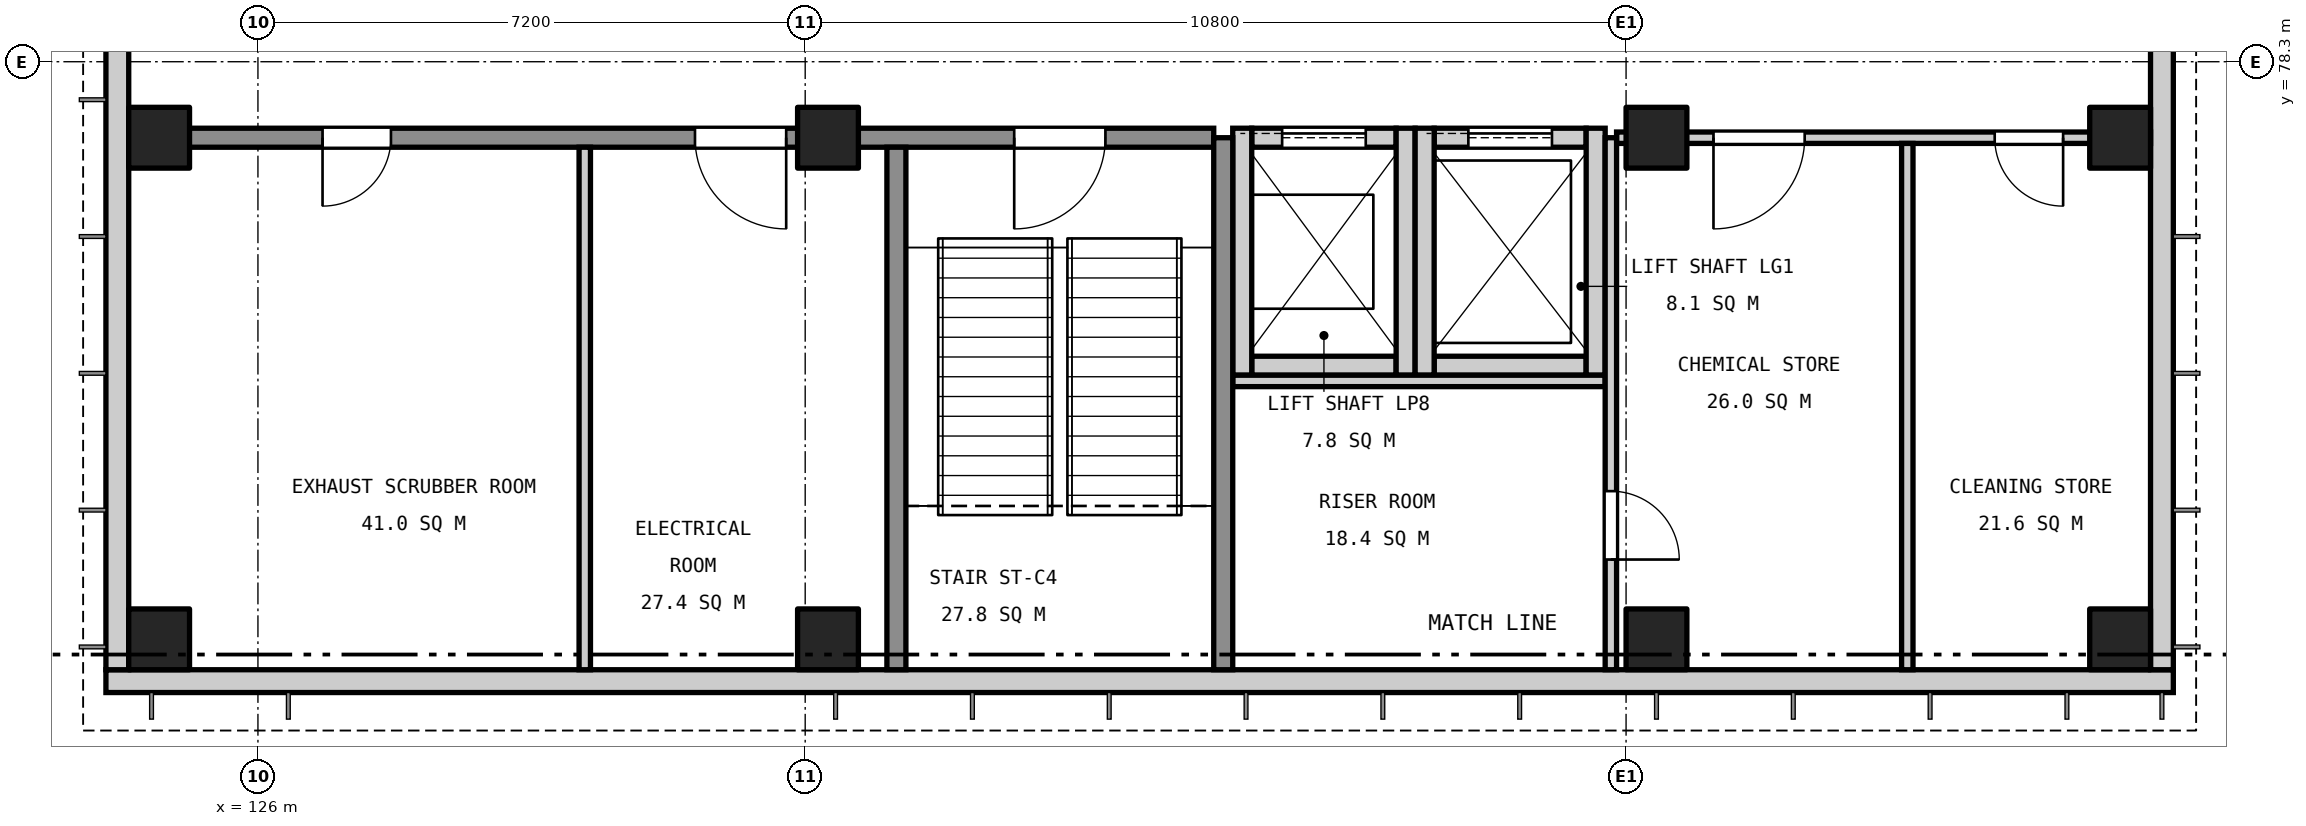
"""IFC4 building model, lengths in metres.
Left out: names, types, materials, properties, quantities, classifications, styles, units other than length and angle.
Written with IfcOpenShell. Run it as: python <this file> out.ifc"""

import sys

from ifc_helpers import new_model, si_unit, direction, frame, frame_2d, origin, origin_2d, place, context, subcontext, project, spatial, rectangle, extrude, element, fill, save


model = new_model("IFC4")
c1 = context("Model", 3, precision=1e-05, world=origin(), true_north=direction((0.0, 1.0)))
c2 = subcontext(c1, "Body", "Model", "MODEL_VIEW")
j1 = project(units=[si_unit("LENGTHUNIT", "METRE"), si_unit("PLANEANGLEUNIT", "RADIAN")], contexts=[c1])
p1 = place(None, origin())
s1 = spatial("IfcSite", under=j1, at=p1, CompositionType="ELEMENT")
p2 = place(p1, origin())
s2 = spatial("IfcBuilding", under=s1, at=p2, CompositionType="ELEMENT")
p3 = place(p2, frame((0.0, 0.0, 16.8)))
s3 = spatial("IfcBuildingStorey", under=s2, at=p3, CompositionType="ELEMENT", Elevation=16.8)
p4 = place(p3, frame((139.075, 74.3, 0.0), z_axis=(0.0, 0.0, 1.0), x_axis=(1.0, 0.0, 0.0)))
e1 = element("IfcWall", 1, at=p4, inside=s3, PredefinedType="SOLIDWALL", context=c2, shape_type="SweptSolid", body=[
    extrude(rectangle(XDim=1.9, YDim=0.25, at=frame_2d((0.95, 0.0))), origin(), (0.0, 0.0, 1.0), 4.95),
])
p5 = place(p3, frame((139.075, 77.3, 0.0), z_axis=(0.0, 0.0, 1.0), x_axis=(1.0, 0.0, 0.0)))
e2 = element("IfcWall", 2, at=p5, inside=s3, PredefinedType="SOLIDWALL", context=c2, shape_type="SweptSolid", body=[
    extrude(rectangle(XDim=1.9, YDim=0.25, at=frame_2d((0.95, 0.0))), origin(), (0.0, 0.0, 1.0), 4.95),
])
p6 = place(p5, frame((0.4, 0.0, 0.0)))
e3 = element("IfcOpeningElement", 3, at=p6, cuts=e2, PredefinedType="OPENING", context=c2, shape_type="SweptSolid", body=[
    extrude(rectangle(XDim=1.1, YDim=2.1, at=frame_2d((0.55, 1.05))), frame((0.0, 0.135, 0.0), z_axis=(0.0, -1.0, 0.0), x_axis=(1.0, 0.0, 0.0)), (0.0, 0.0, 1.0), 0.27),
])
for number, where, z_axis, x_axis in (
    (4, (138.95, 74.175, 0.0), (0.0, 0.0, 1.0), (0.0, 1.0, 0.0)),
    (5, (141.1, 74.175, 0.0), (0.0, 0.0, 1.0), (0.0, 1.0, 0.0)),
):
    element("IfcWall", number, at=place(p3, frame(where, z_axis=z_axis, x_axis=x_axis)), inside=s3, PredefinedType="SOLIDWALL", context=c2, shape_type="SweptSolid", body=[
        extrude(rectangle(XDim=3.25, YDim=0.25, at=frame_2d((1.625, 0.0))), origin(), (0.0, 0.0, 1.0), 4.95),
    ])
p7 = place(p3, frame((141.475, 74.3, 0.0), z_axis=(0.0, 0.0, 1.0), x_axis=(1.0, 0.0, 0.0)))
e6 = element("IfcWall", 6, at=p7, inside=s3, PredefinedType="SOLIDWALL", context=c2, shape_type="SweptSolid", body=[
    extrude(rectangle(XDim=2.0, YDim=0.25, at=frame_2d((1.0, 0.0))), origin(), (0.0, 0.0, 1.0), 4.95),
])
p8 = place(p3, frame((141.475, 77.3, 0.0), z_axis=(0.0, 0.0, 1.0), x_axis=(1.0, 0.0, 0.0)))
e7 = element("IfcWall", 7, at=p8, inside=s3, PredefinedType="SOLIDWALL", context=c2, shape_type="SweptSolid", body=[
    extrude(rectangle(XDim=2.0, YDim=0.25, at=frame_2d((1.0, 0.0))), origin(), (0.0, 0.0, 1.0), 4.95),
])
p9 = place(p8, frame((0.45, 0.0, 0.0)))
e8 = element("IfcOpeningElement", 8, at=p9, cuts=e7, PredefinedType="OPENING", context=c2, shape_type="SweptSolid", body=[
    extrude(rectangle(XDim=1.1, YDim=2.1, at=frame_2d((0.55, 1.05))), frame((0.0, 0.135, 0.0), z_axis=(0.0, -1.0, 0.0), x_axis=(1.0, 0.0, 0.0)), (0.0, 0.0, 1.0), 0.27),
])
for number, where, z_axis, x_axis in (
    (9, (141.35, 74.175, 0.0), (0.0, 0.0, 1.0), (0.0, 1.0, 0.0)),
    (10, (143.6, 74.175, 0.0), (0.0, 0.0, 1.0), (0.0, 1.0, 0.0)),
):
    element("IfcWall", number, at=place(p3, frame(where, z_axis=z_axis, x_axis=x_axis)), inside=s3, PredefinedType="SOLIDWALL", context=c2, shape_type="SweptSolid", body=[
        extrude(rectangle(XDim=3.25, YDim=0.25, at=frame_2d((1.625, 0.0))), origin(), (0.0, 0.0, 1.0), 4.95),
    ])
for number, where, z_axis, x_axis in (
    (11, (124.7, 70.7, 0.0), (0.0, 0.0, 1.0), (1.0, 0.0, 0.0)),
    (12, (124.7, 77.3, 0.0), (0.0, 0.0, 1.0), (1.0, 0.0, 0.0)),
    (13, (133.5, 70.7, 0.0), (0.0, 0.0, 1.0), (1.0, 0.0, 0.0)),
    (14, (133.5, 77.3, 0.0), (0.0, 0.0, 1.0), (1.0, 0.0, 0.0)),
    (15, (144.4, 70.7, 0.0), (0.0, 0.0, 1.0), (1.0, 0.0, 0.0)),
    (16, (144.4, 77.3, 0.0), (0.0, 0.0, 1.0), (1.0, 0.0, 0.0)),
    (17, (150.5, 70.7, 0.0), (0.0, 0.0, 1.0), (1.0, 0.0, 0.0)),
    (18, (150.5, 77.3, 0.0), (0.0, 0.0, 1.0), (1.0, 0.0, 0.0)),
):
    element("IfcColumn", number, at=place(p3, frame(where, z_axis=z_axis, x_axis=x_axis)), inside=s3, PredefinedType="COLUMN", context=c2, shape_type="SweptSolid", body=[
        extrude(rectangle(XDim=0.8, YDim=0.8, at=origin_2d()), origin(), (0.0, 0.0, 1.0), 5.4),
    ])
p10 = place(p3, frame((124.0, 70.15, 0.0), z_axis=(0.0, 0.0, 1.0), x_axis=(1.0, 0.0, 0.0)))
e19 = element("IfcWall", 19, at=p10, inside=s3, PredefinedType="SOLIDWALL", context=c2, shape_type="SweptSolid", body=[
    extrude(rectangle(XDim=27.2, YDim=0.3, at=frame_2d((13.6, 0.0))), origin(), (0.0, 0.0, 1.0), 4.95),
])
for number, where, z_axis, x_axis in (
    (20, (124.15, 70.3, 0.0), (0.0, 0.0, 1.0), (0.0, 1.0, 0.0)),
    (21, (151.05, 70.3, 0.0), (0.0, 0.0, 1.0), (0.0, 1.0, 0.0)),
):
    element("IfcWall", number, at=place(p3, frame(where, z_axis=z_axis, x_axis=x_axis)), inside=s3, PredefinedType="SOLIDWALL", context=c2, shape_type="SweptSolid", body=[
        extrude(rectangle(XDim=36.5, YDim=0.3, at=frame_2d((18.25, 0.0))), origin(), (0.0, 0.0, 1.0), 4.95),
    ])
p11 = place(p3, frame((138.825, 74.1, 0.0), z_axis=(0.0, 0.0, 1.0), x_axis=(1.0, 0.0, 0.0)))
e22 = element("IfcWall", 22, at=p11, inside=s3, PredefinedType="SOLIDWALL", context=c2, shape_type="SweptSolid", body=[
    extrude(rectangle(XDim=4.9, YDim=0.15, at=frame_2d((2.45, 0.0))), origin(), (0.0, 0.0, 1.0), 4.95),
])
p12 = place(p3, frame((124.3, 77.3, 0.0), z_axis=(0.0, 0.0, 1.0), x_axis=(1.0, 0.0, 0.0)))
e23 = element("IfcWall", 23, at=p12, inside=s3, PredefinedType="SOLIDWALL", context=c2, shape_type="SweptSolid", body=[
    extrude(rectangle(XDim=14.275, YDim=0.25, at=frame_2d((7.137, 0.0))), origin(), (0.0, 0.0, 1.0), 4.95),
])
p13 = place(p12, frame((2.55, 0.0, 0.0)))
e24 = element("IfcOpeningElement", 24, at=p13, cuts=e23, PredefinedType="OPENING", context=c2, shape_type="SweptSolid", body=[
    extrude(rectangle(XDim=0.9, YDim=2.1, at=frame_2d((0.45, 1.05))), frame((0.0, 0.135, 0.0), z_axis=(0.0, -1.0, 0.0), x_axis=(1.0, 0.0, 0.0)), (0.0, 0.0, 1.0), 0.27),
])
p14 = place(p12, frame((7.45, 0.0, 0.0)))
e25 = element("IfcOpeningElement", 25, at=p14, cuts=e23, PredefinedType="OPENING", context=c2, shape_type="SweptSolid", body=[
    extrude(rectangle(XDim=1.2, YDim=2.1, at=frame_2d((0.6, 1.05))), frame((0.0, 0.135, 0.0), z_axis=(0.0, -1.0, 0.0), x_axis=(1.0, 0.0, 0.0)), (0.0, 0.0, 1.0), 0.27),
])
p15 = place(p12, frame((11.65, 0.0, 0.0)))
e26 = element("IfcOpeningElement", 26, at=p15, cuts=e23, PredefinedType="OPENING", context=c2, shape_type="SweptSolid", body=[
    extrude(rectangle(XDim=1.2, YDim=2.1, at=frame_2d((0.6, 1.05))), frame((0.0, 0.135, 0.0), z_axis=(0.0, -1.0, 0.0), x_axis=(1.0, 0.0, 0.0)), (0.0, 0.0, 1.0), 0.27),
])
p16 = place(p3, frame((143.875, 77.3, 0.0), z_axis=(0.0, 0.0, 1.0), x_axis=(1.0, 0.0, 0.0)))
e27 = element("IfcWall", 27, at=p16, inside=s3, PredefinedType="SOLIDWALL", context=c2, shape_type="SweptSolid", body=[
    extrude(rectangle(XDim=7.025, YDim=0.15, at=frame_2d((3.512, 0.0))), origin(), (0.0, 0.0, 1.0), 4.95),
])
p17 = place(p16, frame((1.275, 0.0, 0.0)))
e28 = element("IfcOpeningElement", 28, at=p17, cuts=e27, PredefinedType="OPENING", context=c2, shape_type="SweptSolid", body=[
    extrude(rectangle(XDim=1.2, YDim=2.1, at=frame_2d((0.6, 1.05))), frame((0.0, 0.085, 0.0), z_axis=(0.0, -1.0, 0.0), x_axis=(1.0, 0.0, 0.0)), (0.0, 0.0, 1.0), 0.17),
])
p18 = place(p16, frame((4.975, 0.0, 0.0)))
e29 = element("IfcOpeningElement", 29, at=p18, cuts=e27, PredefinedType="OPENING", context=c2, shape_type="SweptSolid", body=[
    extrude(rectangle(XDim=0.9, YDim=2.1, at=frame_2d((0.45, 1.05))), frame((0.0, 0.085, 0.0), z_axis=(0.0, -1.0, 0.0), x_axis=(1.0, 0.0, 0.0)), (0.0, 0.0, 1.0), 0.17),
])
p19 = place(p3, frame((130.3, 70.3, 0.0), z_axis=(0.0, 0.0, 1.0), x_axis=(0.0, 1.0, 0.0)))
e30 = element("IfcWall", 30, at=p19, inside=s3, PredefinedType="SOLIDWALL", context=c2, shape_type="SweptSolid", body=[
    extrude(rectangle(XDim=6.875, YDim=0.15, at=frame_2d((3.438, 0.0))), origin(), (0.0, 0.0, 1.0), 4.95),
])
p20 = place(p3, frame((134.4, 70.3, 0.0), z_axis=(0.0, 0.0, 1.0), x_axis=(0.0, 1.0, 0.0)))
e31 = element("IfcWall", 31, at=p20, inside=s3, PredefinedType="SOLIDWALL", context=c2, shape_type="SweptSolid", body=[
    extrude(rectangle(XDim=6.875, YDim=0.25, at=frame_2d((3.438, 0.0))), origin(), (0.0, 0.0, 1.0), 4.95),
])
p21 = place(p3, frame((138.7, 70.3, 0.0), z_axis=(0.0, 0.0, 1.0), x_axis=(0.0, 1.0, 0.0)))
e32 = element("IfcWall", 32, at=p21, inside=s3, PredefinedType="SOLIDWALL", context=c2, shape_type="SweptSolid", body=[
    extrude(rectangle(XDim=7.0, YDim=0.25, at=frame_2d((3.5, 0.0))), origin(), (0.0, 0.0, 1.0), 4.95),
])
p22 = place(p3, frame((143.8, 70.3, 0.0), z_axis=(0.0, 0.0, 1.0), x_axis=(0.0, 1.0, 0.0)))
e33 = element("IfcWall", 33, at=p22, inside=s3, PredefinedType="SOLIDWALL", context=c2, shape_type="SweptSolid", body=[
    extrude(rectangle(XDim=7.0, YDim=0.15, at=frame_2d((3.5, 0.0))), origin(), (0.0, 0.0, 1.0), 4.95),
])
p23 = place(p22, frame((1.45, 0.0, 0.0)))
e34 = element("IfcOpeningElement", 34, at=p23, cuts=e33, PredefinedType="OPENING", context=c2, shape_type="SweptSolid", body=[
    extrude(rectangle(XDim=0.9, YDim=2.1, at=frame_2d((0.45, 1.05))), frame((0.0, 0.085, 0.0), z_axis=(0.0, -1.0, 0.0), x_axis=(1.0, 0.0, 0.0)), (0.0, 0.0, 1.0), 0.17),
])
p24 = place(p3, frame((147.7, 70.3, 0.0), z_axis=(0.0, 0.0, 1.0), x_axis=(0.0, 1.0, 0.0)))
e35 = element("IfcWall", 35, at=p24, inside=s3, PredefinedType="SOLIDWALL", context=c2, shape_type="SweptSolid", body=[
    extrude(rectangle(XDim=6.925, YDim=0.15, at=frame_2d((3.462, 0.0))), origin(), (0.0, 0.0, 1.0), 4.95),
])
p25 = place(p13, frame((0.9, 0.0, 0.0), z_axis=(0.0, 0.0, 1.0), x_axis=(-1.0, 0.0, 0.0)))
e36 = element("IfcDoor", 36, at=p25, inside=s3, OperationType="SINGLE_SWING_RIGHT", PredefinedType="DOOR", context=c2, shape_type="SweptSolid", body=[
    extrude(rectangle(XDim=0.9, YDim=2.1, at=frame_2d((0.45, 1.05))), frame((0.0, 0.025, 0.0), z_axis=(0.0, -1.0, 0.0), x_axis=(1.0, 0.0, 0.0)), (0.0, 0.0, 1.0), 0.05),
])
fill(e24, e36)
p26 = place(p14, frame((1.2, 0.0, 0.0), z_axis=(0.0, 0.0, 1.0), x_axis=(-1.0, 0.0, 0.0)))
e37 = element("IfcDoor", 37, at=p26, inside=s3, OperationType="SINGLE_SWING_LEFT", PredefinedType="DOOR", context=c2, shape_type="SweptSolid", body=[
    extrude(rectangle(XDim=1.2, YDim=2.1, at=frame_2d((0.6, 1.05))), frame((0.0, 0.025, 0.0), z_axis=(0.0, -1.0, 0.0), x_axis=(1.0, 0.0, 0.0)), (0.0, 0.0, 1.0), 0.05),
])
fill(e25, e37)
p27 = place(p17, frame((1.2, 0.0, 0.0), z_axis=(0.0, 0.0, 1.0), x_axis=(-1.0, 0.0, 0.0)))
e38 = element("IfcDoor", 38, at=p27, inside=s3, OperationType="SINGLE_SWING_RIGHT", PredefinedType="DOOR", context=c2, shape_type="SweptSolid", body=[
    extrude(rectangle(XDim=1.2, YDim=2.1, at=frame_2d((0.6, 1.05))), frame((0.0, 0.025, 0.0), z_axis=(0.0, -1.0, 0.0), x_axis=(1.0, 0.0, 0.0)), (0.0, 0.0, 1.0), 0.05),
])
fill(e28, e38)
p28 = place(p18, frame((0.9, 0.0, 0.0), z_axis=(0.0, 0.0, 1.0), x_axis=(-1.0, 0.0, 0.0)))
e39 = element("IfcDoor", 39, at=p28, inside=s3, OperationType="SINGLE_SWING_LEFT", PredefinedType="DOOR", context=c2, shape_type="SweptSolid", body=[
    extrude(rectangle(XDim=0.9, YDim=2.1, at=frame_2d((0.45, 1.05))), frame((0.0, 0.025, 0.0), z_axis=(0.0, -1.0, 0.0), x_axis=(1.0, 0.0, 0.0)), (0.0, 0.0, 1.0), 0.05),
])
fill(e29, e39)
p29 = place(p23, frame((0.9, 0.0, 0.0), z_axis=(0.0, 0.0, 1.0), x_axis=(-1.0, 0.0, 0.0)))
e40 = element("IfcDoor", 40, at=p29, inside=s3, OperationType="SINGLE_SWING_RIGHT", PredefinedType="DOOR", context=c2, shape_type="SweptSolid", body=[
    extrude(rectangle(XDim=0.9, YDim=2.1, at=frame_2d((0.45, 1.05))), frame((0.0, 0.025, 0.0), z_axis=(0.0, -1.0, 0.0), x_axis=(1.0, 0.0, 0.0)), (0.0, 0.0, 1.0), 0.05),
])
fill(e34, e40)
p30 = place(p15, frame((1.2, 0.0, 0.0), z_axis=(0.0, 0.0, 1.0), x_axis=(-1.0, 0.0, 0.0)))
e41 = element("IfcDoor", 41, at=p30, inside=s3, OperationType="SINGLE_SWING_RIGHT", PredefinedType="DOOR", context=c2, shape_type="SweptSolid", body=[
    extrude(rectangle(XDim=1.2, YDim=2.1, at=frame_2d((0.6, 1.05))), frame((0.0, 0.025, 0.0), z_axis=(0.0, -1.0, 0.0), x_axis=(1.0, 0.0, 0.0)), (0.0, 0.0, 1.0), 0.05),
])
fill(e26, e41)
p31 = place(p6, origin())
e42 = element("IfcDoor", 42, at=p31, inside=s3, OperationType="SLIDING_TO_LEFT", PredefinedType="DOOR", context=c2, shape_type="SweptSolid", body=[
    extrude(rectangle(XDim=1.1, YDim=2.1, at=frame_2d((0.55, 1.05))), frame((0.0, 0.025, 0.0), z_axis=(0.0, -1.0, 0.0), x_axis=(1.0, 0.0, 0.0)), (0.0, 0.0, 1.0), 0.05),
])
fill(e3, e42)
p32 = place(p9, origin())
e43 = element("IfcDoor", 43, at=p32, inside=s3, OperationType="SLIDING_TO_LEFT", PredefinedType="DOOR", context=c2, shape_type="SweptSolid", body=[
    extrude(rectangle(XDim=1.1, YDim=2.1, at=frame_2d((0.55, 1.05))), frame((0.0, 0.025, 0.0), z_axis=(0.0, -1.0, 0.0), x_axis=(1.0, 0.0, 0.0)), (0.0, 0.0, 1.0), 0.05),
])
fill(e8, e43)
save(model, sys.argv[1])
